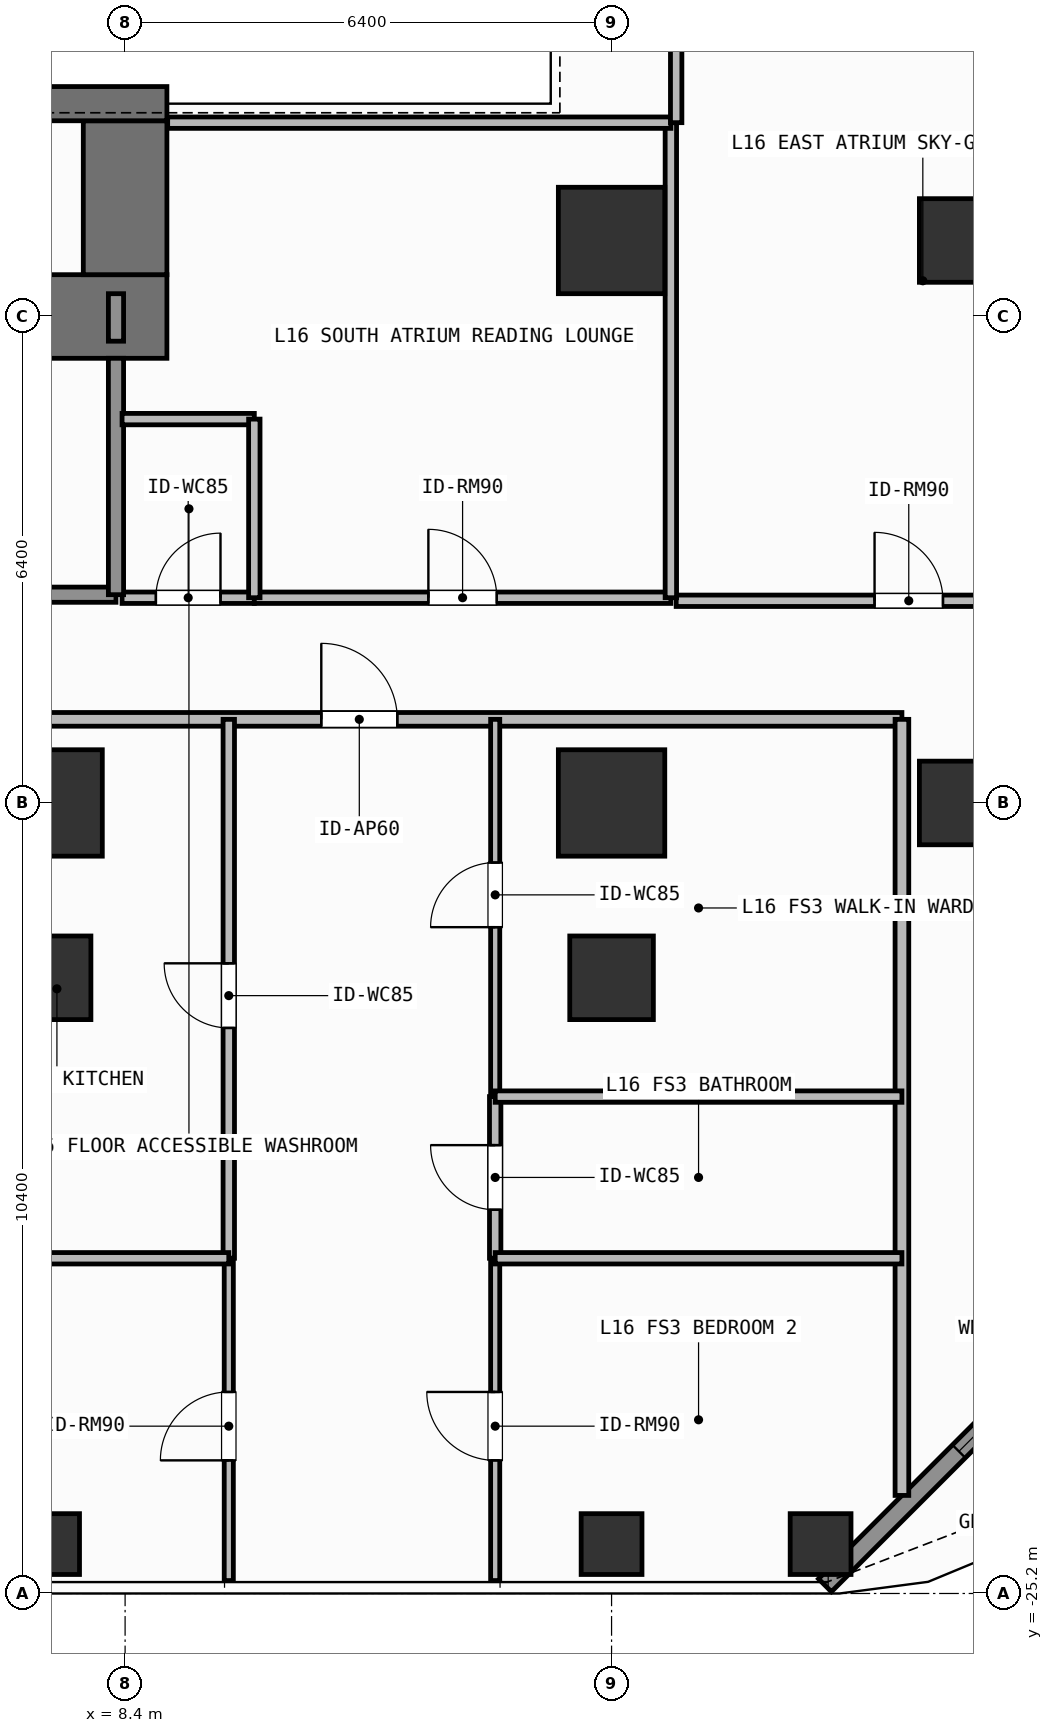
"""IFC4 building model, lengths in metres.
Left out: names, types, materials, properties, quantities, classifications, styles, units other than length and angle.
Written with IfcOpenShell. Run it as: python <this file> out.ifc"""

import sys

from ifc_helpers import new_model, si_unit, direction, frame, frame_2d, origin, origin_2d, place, context, subcontext, project, spatial, rectangle, hollow_rectangle, extrude, element, fill, save


model = new_model("IFC4")
c1 = context("Model", 3, precision=1e-05, world=origin(), true_north=direction((0.0, 1.0)))
c2 = subcontext(c1, "Body", "Model", "MODEL_VIEW")
j1 = project(units=[si_unit("LENGTHUNIT", "METRE"), si_unit("PLANEANGLEUNIT", "RADIAN")], contexts=[c1])
p1 = place(None, origin())
s1 = spatial("IfcSite", under=j1, at=p1, CompositionType="ELEMENT")
p2 = place(p1, origin())
s2 = spatial("IfcBuilding", under=s1, at=p2, CompositionType="ELEMENT")
p3 = place(p2, frame((0.0, 0.0, 61.8)))
s3 = spatial("IfcBuildingStorey", under=s2, at=p3, CompositionType="ELEMENT", Elevation=61.8)
p4 = place(p3, frame((6.12, -8.4, 0.0), z_axis=(0.0, 0.0, 1.0), x_axis=(1.0, 0.0, 0.0)))
e1 = element("IfcWall", 1, at=p4, inside=s3, PredefinedType="SHEAR", context=c2, shape_type="SweptSolid", body=[
    extrude(rectangle(XDim=2.83, YDim=1.1, at=frame_2d((1.415, 0.0))), origin(), (0.0, 0.0, 1.0), 3.9),
])
p5 = place(p3, frame((8.4, -7.85, 0.0), z_axis=(0.0, 0.0, 1.0), x_axis=(0.0, 1.0, 0.0)))
e2 = element("IfcWall", 2, at=p5, inside=s3, PredefinedType="SHEAR", context=c2, shape_type="SweptSolid", body=[
    extrude(rectangle(XDim=2.025, YDim=1.1, at=frame_2d((1.013, 0.0))), origin(), (0.0, 0.0, 1.0), 3.9),
])
p6 = place(p3, frame((3.045, -5.6, 0.0), z_axis=(0.0, 0.0, 1.0), x_axis=(1.0, 0.0, 0.0)))
e3 = element("IfcWall", 3, at=p6, inside=s3, PredefinedType="SHEAR", context=c2, shape_type="SweptSolid", body=[
    extrude(rectangle(XDim=5.905, YDim=0.45, at=frame_2d((2.953, 0.0))), origin(), (0.0, 0.0, 1.0), 3.9),
])
for number, where, z_axis, x_axis in (
    (4, (7.4, -14.8, 0.0), (0.0, 0.0, 1.0), (1.0, 0.0, 0.0)),
    (5, (14.8, -14.8, 0.0), (0.0, 0.0, 1.0), (1.0, 0.0, 0.0)),
    (6, (14.8, -7.4, 0.0), (0.0, 0.0, 1.0), (1.0, 0.0, 0.0)),
):
    element("IfcColumn", number, at=place(p3, frame(where, z_axis=z_axis, x_axis=x_axis)), inside=s3, PredefinedType="COLUMN", context=c2, shape_type="SweptSolid", body=[
        extrude(rectangle(XDim=1.4, YDim=1.4, at=origin_2d()), origin(), (0.0, 0.0, 1.0), 3.9),
    ])
for number, where, z_axis, x_axis in (
    (7, (19.4, -14.8, 0.0), (0.0, 0.0, 1.0), (1.0, 0.0, 0.0)),
    (8, (19.4, -7.4, 0.0), (0.0, 0.0, 1.0), (1.0, 0.0, 0.0)),
    (9, (7.4, -17.1, 0.0), (0.0, 0.0, 1.0), (1.0, 0.0, 0.0)),
    (10, (14.8, -17.1, 0.0), (0.0, 0.0, 1.0), (1.0, 0.0, 0.0)),
):
    element("IfcColumn", number, at=place(p3, frame(where, z_axis=z_axis, x_axis=x_axis)), inside=s3, PredefinedType="COLUMN", context=c2, shape_type="SweptSolid", body=[
        extrude(rectangle(XDim=1.1, YDim=1.1, at=origin_2d()), origin(), (0.0, 0.0, 1.0), 3.9),
    ])
for number, where, z_axis, x_axis in (
    (11, (17.55, -24.55, 0.0), (0.0, 0.0, 1.0), (1.0, 0.0, 0.0)),
    (12, (7.4, -24.55, 0.0), (0.0, 0.0, 1.0), (1.0, 0.0, 0.0)),
    (13, (14.8, -24.55, 0.0), (0.0, 0.0, 1.0), (1.0, 0.0, 0.0)),
):
    element("IfcColumn", number, at=place(p3, frame(where, z_axis=z_axis, x_axis=x_axis)), inside=s3, PredefinedType="COLUMN", context=c2, shape_type="SweptSolid", body=[
        extrude(hollow_rectangle(XDim=0.8, YDim=0.8, WallThickness=0.036, at=origin_2d()), origin(), (0.0, 0.0, 1.0), 3.9),
    ])
p7 = place(p3, frame((22.192, -20.508, 0.0), z_axis=(0.0, 0.0, 1.0), x_axis=(-0.707106781187, -0.707106781187, 0.0)))
e14 = element("IfcWall", 14, at=p7, inside=s3, PredefinedType="SOLIDWALL", context=c2, shape_type="SweptSolid", body=[
    extrude(rectangle(XDim=6.484, YDim=0.24, at=frame_2d((3.242, 0.0))), origin(), (0.0, 0.0, 1.0), 3.68),
])
p8 = place(p7, frame((2.492, 0.0, 0.8)))
e15 = element("IfcOpeningElement", 15, at=p8, cuts=e14, PredefinedType="OPENING", context=c2, shape_type="SweptSolid", body=[
    extrude(rectangle(XDim=1.5, YDim=1.85, at=frame_2d((0.75, 0.925))), frame((0.0, 0.13, 0.0), z_axis=(0.0, -1.0, 0.0), x_axis=(1.0, 0.0, 0.0)), (0.0, 0.0, 1.0), 0.26),
])
p9 = place(p3, frame((4.58, -12.06, 0.0), z_axis=(0.0, 0.0, 1.0), x_axis=(1.0, 0.0, 0.0)))
e16 = element("IfcWall", 16, at=p9, inside=s3, PredefinedType="SOLIDWALL", context=c2, shape_type="SweptSolid", body=[
    extrude(rectangle(XDim=3.7, YDim=0.2, at=frame_2d((1.85, 0.0))), origin(), (0.0, 0.0, 1.0), 3.68),
])
p10 = place(p9, frame((1.212, 0.0, 0.0)))
e17 = element("IfcOpeningElement", 17, at=p10, cuts=e16, PredefinedType="OPENING", context=c2, shape_type="SweptSolid", body=[
    extrude(rectangle(XDim=1.1, YDim=2.15, at=frame_2d((0.55, 1.075))), frame((0.0, 0.11, 0.0), z_axis=(0.0, -1.0, 0.0), x_axis=(1.0, 0.0, 0.0)), (0.0, 0.0, 1.0), 0.22),
])
p11 = place(p3, frame((8.36, -12.1, 0.0), z_axis=(0.0, 0.0, 1.0), x_axis=(1.0, 0.0, 0.0)))
e18 = element("IfcWall", 18, at=p11, inside=s3, PredefinedType="PARTITIONING", context=c2, shape_type="SweptSolid", body=[
    extrude(rectangle(XDim=1.74, YDim=0.15, at=frame_2d((0.87, 0.0))), origin(), (0.0, 0.0, 1.0), 3.68),
])
p12 = place(p11, frame((0.445, 0.0, 0.0)))
e19 = element("IfcOpeningElement", 19, at=p12, cuts=e18, PredefinedType="OPENING", context=c2, shape_type="SweptSolid", body=[
    extrude(rectangle(XDim=0.85, YDim=2.1, at=frame_2d((0.425, 1.05))), frame((0.0, 0.085, 0.0), z_axis=(0.0, -1.0, 0.0), x_axis=(1.0, 0.0, 0.0)), (0.0, 0.0, 1.0), 0.17),
])
p13 = place(p3, frame((10.1, -12.1, 0.0), z_axis=(0.0, 0.0, 1.0), x_axis=(1.0, 0.0, 0.0)))
e20 = element("IfcWall", 20, at=p13, inside=s3, PredefinedType="PARTITIONING", context=c2, shape_type="SweptSolid", body=[
    extrude(rectangle(XDim=5.48, YDim=0.15, at=frame_2d((2.74, 0.0))), origin(), (0.0, 0.0, 1.0), 3.68),
])
p14 = place(p13, frame((2.29, 0.0, 0.0)))
e21 = element("IfcOpeningElement", 21, at=p14, cuts=e20, PredefinedType="OPENING", context=c2, shape_type="SweptSolid", body=[
    extrude(rectangle(XDim=0.9, YDim=2.1, at=frame_2d((0.45, 1.05))), frame((0.0, 0.085, 0.0), z_axis=(0.0, -1.0, 0.0), x_axis=(1.0, 0.0, 0.0)), (0.0, 0.0, 1.0), 0.17),
])
p15 = place(p3, frame((5.242, -13.7, 0.0), z_axis=(0.0, 0.0, 1.0), x_axis=(1.0, 0.0, 0.0)))
e22 = element("IfcWall", 22, at=p15, inside=s3, PredefinedType="PARTITIONING", context=c2, shape_type="SweptSolid", body=[
    extrude(rectangle(XDim=13.378, YDim=0.18, at=frame_2d((6.689, 0.0))), origin(), (0.0, 0.0, 1.0), 3.68),
])
p16 = place(p15, frame((5.739, 0.0, 0.0)))
e23 = element("IfcOpeningElement", 23, at=p16, cuts=e22, PredefinedType="OPENING", context=c2, shape_type="SweptSolid", body=[
    extrude(rectangle(XDim=1.0, YDim=2.2, at=frame_2d((0.5, 1.1))), frame((0.0, 0.1, 0.0), z_axis=(0.0, -1.0, 0.0), x_axis=(1.0, 0.0, 0.0)), (0.0, 0.0, 1.0), 0.2),
])
p17 = place(p3, frame((9.764, -20.79, 0.0), z_axis=(0.0, 0.0, 1.0), x_axis=(0.0, 1.0, 0.0)))
e24 = element("IfcWall", 24, at=p17, inside=s3, PredefinedType="PARTITIONING", context=c2, shape_type="SweptSolid", body=[
    extrude(rectangle(XDim=7.09, YDim=0.15, at=frame_2d((3.545, 0.0))), origin(), (0.0, 0.0, 1.0), 3.68),
])
p18 = place(p17, frame((3.03, 0.0, 0.0)))
e25 = element("IfcOpeningElement", 25, at=p18, cuts=e24, PredefinedType="OPENING", context=c2, shape_type="SweptSolid", body=[
    extrude(rectangle(XDim=0.85, YDim=2.1, at=frame_2d((0.425, 1.05))), frame((0.0, 0.085, 0.0), z_axis=(0.0, -1.0, 0.0), x_axis=(1.0, 0.0, 0.0)), (0.0, 0.0, 1.0), 0.17),
])
p19 = place(p3, frame((9.764, -25.03, 0.0), z_axis=(0.0, 0.0, 1.0), x_axis=(0.0, 1.0, 0.0)))
e26 = element("IfcWall", 26, at=p19, inside=s3, PredefinedType="PARTITIONING", context=c2, shape_type="SweptSolid", body=[
    extrude(rectangle(XDim=4.24, YDim=0.12, at=frame_2d((2.12, 0.0))), origin(), (0.0, 0.0, 1.0), 3.68),
])
p20 = place(p19, frame((1.581, 0.0, 0.0)))
e27 = element("IfcOpeningElement", 27, at=p20, cuts=e26, PredefinedType="OPENING", context=c2, shape_type="SweptSolid", body=[
    extrude(rectangle(XDim=0.9, YDim=2.1, at=frame_2d((0.45, 1.05))), frame((0.0, 0.07, 0.0), z_axis=(0.0, -1.0, 0.0), x_axis=(1.0, 0.0, 0.0)), (0.0, 0.0, 1.0), 0.14),
])
p21 = place(p3, frame((13.269, -20.79, 0.0), z_axis=(0.0, 0.0, 1.0), x_axis=(0.0, 1.0, 0.0)))
e28 = element("IfcWall", 28, at=p21, inside=s3, PredefinedType="PARTITIONING", context=c2, shape_type="SweptSolid", body=[
    extrude(rectangle(XDim=2.127, YDim=0.15, at=frame_2d((1.063, 0.0))), origin(), (0.0, 0.0, 1.0), 3.68),
])
p22 = place(p21, frame((0.638, 0.0, 0.0)))
e29 = element("IfcOpeningElement", 29, at=p22, cuts=e28, PredefinedType="OPENING", context=c2, shape_type="SweptSolid", body=[
    extrude(rectangle(XDim=0.85, YDim=2.1, at=frame_2d((0.425, 1.05))), frame((0.0, 0.085, 0.0), z_axis=(0.0, -1.0, 0.0), x_axis=(1.0, 0.0, 0.0)), (0.0, 0.0, 1.0), 0.17),
])
p23 = place(p3, frame((13.269, -18.663, 0.0), z_axis=(0.0, 0.0, 1.0), x_axis=(0.0, 1.0, 0.0)))
e30 = element("IfcWall", 30, at=p23, inside=s3, PredefinedType="PARTITIONING", context=c2, shape_type="SweptSolid", body=[
    extrude(rectangle(XDim=4.963, YDim=0.12, at=frame_2d((2.481, 0.0))), origin(), (0.0, 0.0, 1.0), 3.68),
])
p24 = place(p23, frame((2.229, 0.0, 0.0)))
e31 = element("IfcOpeningElement", 31, at=p24, cuts=e30, PredefinedType="OPENING", context=c2, shape_type="SweptSolid", body=[
    extrude(rectangle(XDim=0.85, YDim=2.1, at=frame_2d((0.425, 1.05))), frame((0.0, 0.07, 0.0), z_axis=(0.0, -1.0, 0.0), x_axis=(1.0, 0.0, 0.0)), (0.0, 0.0, 1.0), 0.14),
])
p25 = place(p3, frame((13.269, -25.03, 0.0), z_axis=(0.0, 0.0, 1.0), x_axis=(0.0, 1.0, 0.0)))
e32 = element("IfcWall", 32, at=p25, inside=s3, PredefinedType="PARTITIONING", context=c2, shape_type="SweptSolid", body=[
    extrude(rectangle(XDim=4.24, YDim=0.12, at=frame_2d((2.12, 0.0))), origin(), (0.0, 0.0, 1.0), 3.68),
])
p26 = place(p25, frame((1.581, 0.0, 0.0)))
e33 = element("IfcOpeningElement", 33, at=p26, cuts=e32, PredefinedType="OPENING", context=c2, shape_type="SweptSolid", body=[
    extrude(rectangle(XDim=0.9, YDim=2.1, at=frame_2d((0.45, 1.05))), frame((0.0, 0.07, 0.0), z_axis=(0.0, -1.0, 0.0), x_axis=(1.0, 0.0, 0.0)), (0.0, 0.0, 1.0), 0.14),
])
p27 = place(p3, frame((15.65, -12.14, 0.0), z_axis=(0.0, 0.0, 1.0), x_axis=(1.0, 0.0, 0.0)))
e34 = element("IfcWall", 34, at=p27, inside=s3, PredefinedType="PARTITIONING", context=c2, shape_type="SweptSolid", body=[
    extrude(rectangle(XDim=6.47, YDim=0.15, at=frame_2d((3.235, 0.0))), origin(), (0.0, 0.0, 1.0), 3.68),
])
p28 = place(p27, frame((2.61, 0.0, 0.0)))
e35 = element("IfcOpeningElement", 35, at=p28, cuts=e34, PredefinedType="OPENING", context=c2, shape_type="SweptSolid", body=[
    extrude(rectangle(XDim=0.9, YDim=2.1, at=frame_2d((0.45, 1.05))), frame((0.0, 0.085, 0.0), z_axis=(0.0, -1.0, 0.0), x_axis=(1.0, 0.0, 0.0)), (0.0, 0.0, 1.0), 0.17),
])
p29 = place(p3, frame((8.28, -12.06, 0.0), z_axis=(0.0, 0.0, 1.0), x_axis=(0.0, 1.0, 0.0)))
e36 = element("IfcWall", 36, at=p29, inside=s3, PredefinedType="SOLIDWALL", context=c2, shape_type="SweptSolid", body=[
    extrude(rectangle(XDim=3.11, YDim=0.2, at=frame_2d((1.555, 0.0))), origin(), (0.0, 0.0, 1.0), 3.68),
])
p30 = place(p3, frame((8.28, -8.725, 0.0), z_axis=(0.0, 0.0, 1.0), x_axis=(0.0, 1.0, 0.0)))
e37 = element("IfcWall", 37, at=p30, inside=s3, PredefinedType="SOLIDWALL", context=c2, shape_type="SweptSolid", body=[
    extrude(rectangle(XDim=0.625, YDim=0.2, at=frame_2d((0.312, 0.0))), origin(), (0.0, 0.0, 1.0), 3.68),
])
p31 = place(p3, frame((8.36, -9.75, 0.0), z_axis=(0.0, 0.0, 1.0), x_axis=(1.0, 0.0, 0.0)))
e38 = element("IfcWall", 38, at=p31, inside=s3, PredefinedType="PARTITIONING", context=c2, shape_type="SweptSolid", body=[
    extrude(rectangle(XDim=1.74, YDim=0.15, at=frame_2d((0.87, 0.0))), origin(), (0.0, 0.0, 1.0), 3.68),
])
p32 = place(p3, frame((10.1, -12.1, 0.0), z_axis=(0.0, 0.0, 1.0), x_axis=(0.0, 1.0, 0.0)))
e39 = element("IfcWall", 39, at=p32, inside=s3, PredefinedType="PARTITIONING", context=c2, shape_type="SweptSolid", body=[
    extrude(rectangle(XDim=2.35, YDim=0.15, at=frame_2d((1.175, 0.0))), origin(), (0.0, 0.0, 1.0), 3.68),
])
p33 = place(p3, frame((15.58, -12.1, 0.0), z_axis=(0.0, 0.0, 1.0), x_axis=(0.0, 1.0, 0.0)))
e40 = element("IfcWall", 40, at=p33, inside=s3, PredefinedType="PARTITIONING", context=c2, shape_type="SweptSolid", body=[
    extrude(rectangle(XDim=6.25, YDim=0.15, at=frame_2d((3.125, 0.0))), origin(), (0.0, 0.0, 1.0), 3.68),
])
p34 = place(p3, frame((8.96, -5.85, 0.0), z_axis=(0.0, 0.0, 1.0), x_axis=(1.0, 0.0, 0.0)))
e41 = element("IfcWall", 41, at=p34, inside=s3, PredefinedType="PARTITIONING", context=c2, shape_type="SweptSolid", body=[
    extrude(rectangle(XDim=6.62, YDim=0.15, at=frame_2d((3.31, 0.0))), origin(), (0.0, 0.0, 1.0), 3.68),
])
p35 = place(p3, frame((18.62, -23.91, 0.0), z_axis=(0.0, 0.0, 1.0), x_axis=(0.0, 1.0, 0.0)))
e42 = element("IfcWall", 42, at=p35, inside=s3, PredefinedType="PARTITIONING", context=c2, shape_type="SweptSolid", body=[
    extrude(rectangle(XDim=10.21, YDim=0.18, at=frame_2d((5.105, 0.0))), origin(), (0.0, 0.0, 1.0), 3.68),
])
p36 = place(p3, frame((5.242, -20.79, 0.0), z_axis=(0.0, 0.0, 1.0), x_axis=(1.0, 0.0, 0.0)))
e43 = element("IfcWall", 43, at=p36, inside=s3, PredefinedType="PARTITIONING", context=c2, shape_type="SweptSolid", body=[
    extrude(rectangle(XDim=4.522, YDim=0.15, at=frame_2d((2.261, 0.0))), origin(), (0.0, 0.0, 1.0), 3.68),
])
for number, where, z_axis, x_axis in (
    (44, (13.269, -18.663, 0.0), (0.0, 0.0, 1.0), (1.0, 0.0, 0.0)),
    (45, (13.269, -20.79, 0.0), (0.0, 0.0, 1.0), (1.0, 0.0, 0.0)),
):
    element("IfcWall", number, at=place(p3, frame(where, z_axis=z_axis, x_axis=x_axis)), inside=s3, PredefinedType="PARTITIONING", context=c2, shape_type="SweptSolid", body=[
        extrude(rectangle(XDim=5.351, YDim=0.15, at=frame_2d((2.676, 0.0))), origin(), (0.0, 0.0, 1.0), 3.68),
    ])
p37 = place(p3, frame((15.65, -5.85, 0.0), z_axis=(0.0, 0.0, 1.0), x_axis=(0.0, 1.0, 0.0)))
e46 = element("IfcWall", 46, at=p37, inside=s3, PredefinedType="PARTITIONING", context=c2, shape_type="SweptSolid", body=[
    extrude(rectangle(XDim=2.15, YDim=0.15, at=frame_2d((1.075, 0.0))), origin(), (0.0, 0.0, 1.0), 3.68),
])
p38 = place(p8, origin())
e47 = element("IfcWindow", 47, at=p38, inside=s3, PartitioningType="SINGLE_PANEL", PredefinedType="WINDOW", context=c2, shape_type="SweptSolid", body=[
    extrude(rectangle(XDim=1.5, YDim=1.85, at=frame_2d((0.75, 0.925))), frame((0.0, 0.03, 0.0), z_axis=(0.0, -1.0, 0.0), x_axis=(1.0, 0.0, 0.0)), (0.0, 0.0, 1.0), 0.06),
])
fill(e15, e47)
p39 = place(p12, origin())
e48 = element("IfcDoor", 48, at=p39, inside=s3, OperationType="SINGLE_SWING_RIGHT", PredefinedType="DOOR", context=c2, shape_type="SweptSolid", body=[
    extrude(rectangle(XDim=0.85, YDim=2.1, at=frame_2d((0.425, 1.05))), frame((0.0, 0.025, 0.0), z_axis=(0.0, -1.0, 0.0), x_axis=(1.0, 0.0, 0.0)), (0.0, 0.0, 1.0), 0.05),
])
fill(e19, e48)
p40 = place(p14, origin())
e49 = element("IfcDoor", 49, at=p40, inside=s3, OperationType="SINGLE_SWING_LEFT", PredefinedType="DOOR", context=c2, shape_type="SweptSolid", body=[
    extrude(rectangle(XDim=0.9, YDim=2.1, at=frame_2d((0.45, 1.05))), frame((0.0, 0.025, 0.0), z_axis=(0.0, -1.0, 0.0), x_axis=(1.0, 0.0, 0.0)), (0.0, 0.0, 1.0), 0.05),
])
fill(e21, e49)
p41 = place(p16, origin())
e50 = element("IfcDoor", 50, at=p41, inside=s3, OperationType="SINGLE_SWING_LEFT", PredefinedType="DOOR", context=c2, shape_type="SweptSolid", body=[
    extrude(rectangle(XDim=1.0, YDim=2.2, at=frame_2d((0.5, 1.1))), frame((0.0, 0.025, 0.0), z_axis=(0.0, -1.0, 0.0), x_axis=(1.0, 0.0, 0.0)), (0.0, 0.0, 1.0), 0.05),
])
fill(e23, e50)
p42 = place(p18, origin())
e51 = element("IfcDoor", 51, at=p42, inside=s3, OperationType="SINGLE_SWING_RIGHT", PredefinedType="DOOR", context=c2, shape_type="SweptSolid", body=[
    extrude(rectangle(XDim=0.85, YDim=2.1, at=frame_2d((0.425, 1.05))), frame((0.0, 0.025, 0.0), z_axis=(0.0, -1.0, 0.0), x_axis=(1.0, 0.0, 0.0)), (0.0, 0.0, 1.0), 0.05),
])
fill(e25, e51)
p43 = place(p20, origin())
e52 = element("IfcDoor", 52, at=p43, inside=s3, OperationType="SINGLE_SWING_LEFT", PredefinedType="DOOR", context=c2, shape_type="SweptSolid", body=[
    extrude(rectangle(XDim=0.9, YDim=2.1, at=frame_2d((0.45, 1.05))), frame((0.0, 0.025, 0.0), z_axis=(0.0, -1.0, 0.0), x_axis=(1.0, 0.0, 0.0)), (0.0, 0.0, 1.0), 0.05),
])
fill(e27, e52)
p44 = place(p22, origin())
e53 = element("IfcDoor", 53, at=p44, inside=s3, OperationType="SINGLE_SWING_RIGHT", PredefinedType="DOOR", context=c2, shape_type="SweptSolid", body=[
    extrude(rectangle(XDim=0.85, YDim=2.1, at=frame_2d((0.425, 1.05))), frame((0.0, 0.025, 0.0), z_axis=(0.0, -1.0, 0.0), x_axis=(1.0, 0.0, 0.0)), (0.0, 0.0, 1.0), 0.05),
])
fill(e29, e53)
p45 = place(p24, origin())
e54 = element("IfcDoor", 54, at=p45, inside=s3, OperationType="SINGLE_SWING_LEFT", PredefinedType="DOOR", context=c2, shape_type="SweptSolid", body=[
    extrude(rectangle(XDim=0.85, YDim=2.1, at=frame_2d((0.425, 1.05))), frame((0.0, 0.025, 0.0), z_axis=(0.0, -1.0, 0.0), x_axis=(1.0, 0.0, 0.0)), (0.0, 0.0, 1.0), 0.05),
])
fill(e31, e54)
p46 = place(p26, origin())
e55 = element("IfcDoor", 55, at=p46, inside=s3, OperationType="SINGLE_SWING_RIGHT", PredefinedType="DOOR", context=c2, shape_type="SweptSolid", body=[
    extrude(rectangle(XDim=0.9, YDim=2.1, at=frame_2d((0.45, 1.05))), frame((0.0, 0.025, 0.0), z_axis=(0.0, -1.0, 0.0), x_axis=(1.0, 0.0, 0.0)), (0.0, 0.0, 1.0), 0.05),
])
fill(e33, e55)
p47 = place(p28, origin())
e56 = element("IfcDoor", 56, at=p47, inside=s3, OperationType="SINGLE_SWING_LEFT", PredefinedType="DOOR", context=c2, shape_type="SweptSolid", body=[
    extrude(rectangle(XDim=0.9, YDim=2.1, at=frame_2d((0.45, 1.05))), frame((0.0, 0.025, 0.0), z_axis=(0.0, -1.0, 0.0), x_axis=(1.0, 0.0, 0.0)), (0.0, 0.0, 1.0), 0.05),
])
fill(e35, e56)
save(model, sys.argv[1])
